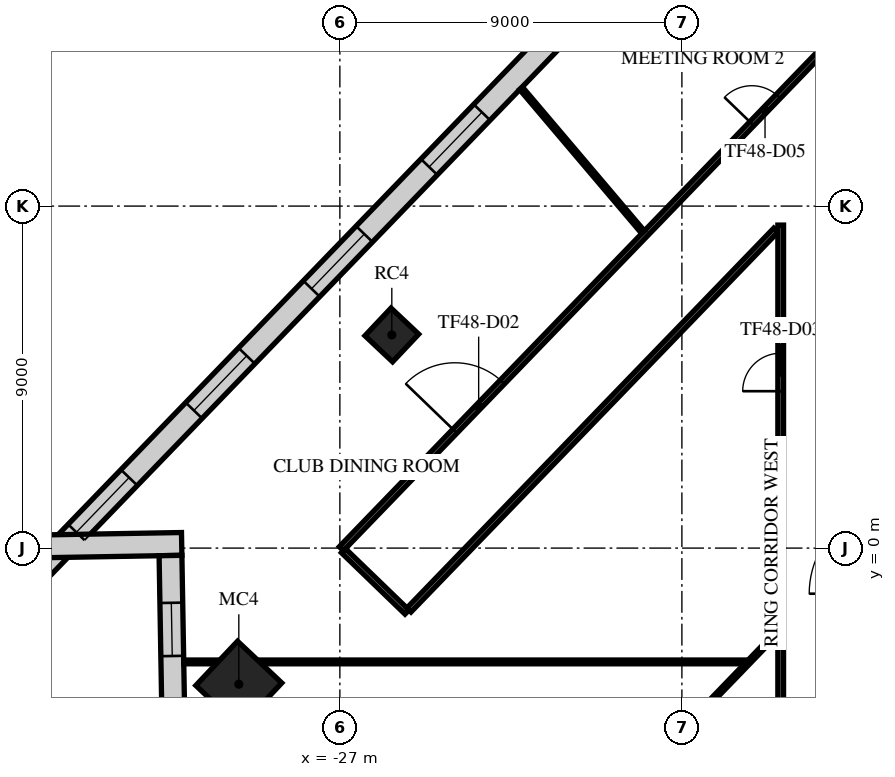
"""IFC4 building model, lengths in metres.
Left out: names, types, materials, properties, quantities, classifications, styles, units other than length and angle.
Written with IfcOpenShell. Run it as: python <this file> out.ifc"""

import sys

from ifc_helpers import new_model, si_unit, direction, frame, frame_2d, origin, origin_2d, place, context, subcontext, project, spatial, rectangle, extrude, element, fill, save


model = new_model("IFC4")
c1 = context("Model", 3, precision=1e-05, world=origin(), true_north=direction((0.0, 1.0)))
c2 = subcontext(c1, "Body", "Model", "MODEL_VIEW")
j1 = project(units=[si_unit("LENGTHUNIT", "METRE"), si_unit("PLANEANGLEUNIT", "RADIAN")], contexts=[c1])
p1 = place(None, origin())
s1 = spatial("IfcSite", under=j1, at=p1, CompositionType="ELEMENT")
p2 = place(p1, origin())
s2 = spatial("IfcBuilding", under=s1, at=p2, CompositionType="ELEMENT")
p3 = place(p2, frame((0.0, 0.0, 205.3)))
s3 = spatial("IfcBuildingStorey", under=s2, at=p3, CompositionType="ELEMENT", Elevation=205.3)
p4 = place(p3, frame((-25.633, 5.609, 0.0), z_axis=(0.0, 0.0, 1.0), x_axis=(0.685916152371, 0.727680583715, 0.0)))
e1 = element("IfcColumn", 1, at=p4, inside=s3, PredefinedType="COLUMN", context=c2, shape_type="SweptSolid", body=[
    extrude(rectangle(XDim=1.0, YDim=1.0, at=origin_2d()), origin(), (0.0, 0.0, 1.0), 4.0),
])
p5 = place(p3, frame((-29.659, -3.582, 0.0), z_axis=(0.0, 0.0, 1.0), x_axis=(0.685916152371, 0.727680583715, 0.0)))
e2 = element("IfcColumn", 2, at=p5, inside=s3, PredefinedType="COLUMN", context=c2, shape_type="SweptSolid", body=[
    extrude(rectangle(XDim=1.6, YDim=1.6, at=origin_2d()), origin(), (0.0, 0.0, 1.0), 4.0),
])
p6 = place(p3, frame((-0.749, 34.782, 0.0), z_axis=(0.0, 0.0, 1.0), x_axis=(-0.694657553534, -0.719340589233, 0.0)))
e3 = element("IfcWall", 3, at=p6, inside=s3, PredefinedType="STANDARD", context=c2, shape_type="SweptSolid", body=[
    extrude(rectangle(XDim=49.0, YDim=0.6, at=frame_2d((24.5, 0.0))), origin(), (0.0, 0.0, 1.0), 3.62),
])
p7 = place(p6, frame((1.227, 0.0, 0.9)))
e4 = element("IfcOpeningElement", 4, at=p7, cuts=e3, PredefinedType="OPENING", context=c2, shape_type="SweptSolid", body=[
    extrude(rectangle(XDim=2.0, YDim=2.1, at=frame_2d((1.0, 1.05))), frame((0.0, 0.31, 0.0), z_axis=(0.0, -1.0, 0.0), x_axis=(1.0, 0.0, 0.0)), (0.0, 0.0, 1.0), 0.62),
])
p8 = place(p6, frame((5.682, 0.0, 0.9)))
e5 = element("IfcOpeningElement", 5, at=p8, cuts=e3, PredefinedType="OPENING", context=c2, shape_type="SweptSolid", body=[
    extrude(rectangle(XDim=2.0, YDim=2.1, at=frame_2d((1.0, 1.05))), frame((0.0, 0.31, 0.0), z_axis=(0.0, -1.0, 0.0), x_axis=(1.0, 0.0, 0.0)), (0.0, 0.0, 1.0), 0.62),
])
p9 = place(p6, frame((10.136, 0.0, 0.9)))
e6 = element("IfcOpeningElement", 6, at=p9, cuts=e3, PredefinedType="OPENING", context=c2, shape_type="SweptSolid", body=[
    extrude(rectangle(XDim=2.0, YDim=2.1, at=frame_2d((1.0, 1.05))), frame((0.0, 0.31, 0.0), z_axis=(0.0, -1.0, 0.0), x_axis=(1.0, 0.0, 0.0)), (0.0, 0.0, 1.0), 0.62),
])
p10 = place(p6, frame((14.591, 0.0, 0.9)))
e7 = element("IfcOpeningElement", 7, at=p10, cuts=e3, PredefinedType="OPENING", context=c2, shape_type="SweptSolid", body=[
    extrude(rectangle(XDim=2.0, YDim=2.1, at=frame_2d((1.0, 1.05))), frame((0.0, 0.31, 0.0), z_axis=(0.0, -1.0, 0.0), x_axis=(1.0, 0.0, 0.0)), (0.0, 0.0, 1.0), 0.62),
])
p11 = place(p6, frame((19.045, 0.0, 0.9)))
e8 = element("IfcOpeningElement", 8, at=p11, cuts=e3, PredefinedType="OPENING", context=c2, shape_type="SweptSolid", body=[
    extrude(rectangle(XDim=2.0, YDim=2.1, at=frame_2d((1.0, 1.05))), frame((0.0, 0.31, 0.0), z_axis=(0.0, -1.0, 0.0), x_axis=(1.0, 0.0, 0.0)), (0.0, 0.0, 1.0), 0.62),
])
p12 = place(p6, frame((23.5, 0.0, 0.9)))
e9 = element("IfcOpeningElement", 9, at=p12, cuts=e3, PredefinedType="OPENING", context=c2, shape_type="SweptSolid", body=[
    extrude(rectangle(XDim=2.0, YDim=2.1, at=frame_2d((1.0, 1.05))), frame((0.0, 0.31, 0.0), z_axis=(0.0, -1.0, 0.0), x_axis=(1.0, 0.0, 0.0)), (0.0, 0.0, 1.0), 0.62),
])
p13 = place(p6, frame((27.955, 0.0, 0.9)))
e10 = element("IfcOpeningElement", 10, at=p13, cuts=e3, PredefinedType="OPENING", context=c2, shape_type="SweptSolid", body=[
    extrude(rectangle(XDim=2.0, YDim=2.1, at=frame_2d((1.0, 1.05))), frame((0.0, 0.31, 0.0), z_axis=(0.0, -1.0, 0.0), x_axis=(1.0, 0.0, 0.0)), (0.0, 0.0, 1.0), 0.62),
])
p14 = place(p6, frame((32.409, 0.0, 0.9)))
e11 = element("IfcOpeningElement", 11, at=p14, cuts=e3, PredefinedType="OPENING", context=c2, shape_type="SweptSolid", body=[
    extrude(rectangle(XDim=2.0, YDim=2.1, at=frame_2d((1.0, 1.05))), frame((0.0, 0.31, 0.0), z_axis=(0.0, -1.0, 0.0), x_axis=(1.0, 0.0, 0.0)), (0.0, 0.0, 1.0), 0.62),
])
p15 = place(p6, frame((36.864, 0.0, 0.9)))
e12 = element("IfcOpeningElement", 12, at=p15, cuts=e3, PredefinedType="OPENING", context=c2, shape_type="SweptSolid", body=[
    extrude(rectangle(XDim=2.0, YDim=2.1, at=frame_2d((1.0, 1.05))), frame((0.0, 0.31, 0.0), z_axis=(0.0, -1.0, 0.0), x_axis=(1.0, 0.0, 0.0)), (0.0, 0.0, 1.0), 0.62),
])
p16 = place(p6, frame((41.318, 0.0, 0.9)))
e13 = element("IfcOpeningElement", 13, at=p16, cuts=e3, PredefinedType="OPENING", context=c2, shape_type="SweptSolid", body=[
    extrude(rectangle(XDim=2.0, YDim=2.1, at=frame_2d((1.0, 1.05))), frame((0.0, 0.31, 0.0), z_axis=(0.0, -1.0, 0.0), x_axis=(1.0, 0.0, 0.0)), (0.0, 0.0, 1.0), 0.62),
])
p17 = place(p6, frame((45.773, 0.0, 0.9)))
e14 = element("IfcOpeningElement", 14, at=p17, cuts=e3, PredefinedType="OPENING", context=c2, shape_type="SweptSolid", body=[
    extrude(rectangle(XDim=2.0, YDim=2.1, at=frame_2d((1.0, 1.05))), frame((0.0, 0.31, 0.0), z_axis=(0.0, -1.0, 0.0), x_axis=(1.0, 0.0, 0.0)), (0.0, 0.0, 1.0), 0.62),
])
p18 = place(p3, frame((-35.008, 0.042, 0.0), z_axis=(0.0, 0.0, 1.0), x_axis=(0.999847642189, 0.017455440681, 0.0)))
e15 = element("IfcWall", 15, at=p18, inside=s3, PredefinedType="STANDARD", context=c2, shape_type="SweptSolid", body=[
    extrude(rectangle(XDim=3.846, YDim=0.6, at=frame_2d((1.923, 0.0))), origin(), (0.0, 0.0, 1.0), 3.62),
])
p19 = place(p3, frame((-31.457, -0.196, 0.0), z_axis=(0.0, 0.0, 1.0), x_axis=(0.017451978485, -0.999847702626, 0.0)))
e16 = element("IfcWall", 16, at=p19, inside=s3, PredefinedType="STANDARD", context=c2, shape_type="SweptSolid", body=[
    extrude(rectangle(XDim=7.778, YDim=0.6, at=frame_2d((3.889, 0.0))), origin(), (0.0, 0.0, 1.0), 3.62),
])
p20 = place(p19, frame((1.244, 0.0, 0.9)))
e17 = element("IfcOpeningElement", 17, at=p20, cuts=e16, PredefinedType="OPENING", context=c2, shape_type="SweptSolid", body=[
    extrude(rectangle(XDim=1.4, YDim=2.1, at=frame_2d((0.7, 1.05))), frame((0.0, 0.31, 0.0), z_axis=(0.0, -1.0, 0.0), x_axis=(1.0, 0.0, 0.0)), (0.0, 0.0, 1.0), 0.62),
])
p21 = place(p19, frame((5.134, 0.0, 0.9)))
e18 = element("IfcOpeningElement", 18, at=p21, cuts=e16, PredefinedType="OPENING", context=c2, shape_type="SweptSolid", body=[
    extrude(rectangle(XDim=1.4, YDim=2.1, at=frame_2d((0.7, 1.05))), frame((0.0, 0.31, 0.0), z_axis=(0.0, -1.0, 0.0), x_axis=(1.0, 0.0, 0.0)), (0.0, 0.0, 1.0), 0.62),
])
p22 = place(p3, frame((-26.96, -0.016, 0.0), z_axis=(0.0, 0.0, 1.0), x_axis=(0.694654845656, 0.719343204184, 0.0)))
e19 = element("IfcWall", 19, at=p22, inside=s3, PredefinedType="PARTITIONING", context=c2, shape_type="SweptSolid", body=[
    extrude(rectangle(XDim=37.479, YDim=0.15, at=frame_2d((18.74, 0.0))), origin(), (0.0, 0.0, 1.0), 2.97),
])
p23 = place(p22, frame((4.3, 0.0, 0.0)))
e20 = element("IfcOpeningElement", 20, at=p23, cuts=e19, PredefinedType="OPENING", context=c2, shape_type="SweptSolid", body=[
    extrude(rectangle(XDim=1.8, YDim=2.1, at=frame_2d((0.9, 1.05))), frame((0.0, 0.085, 0.0), z_axis=(0.0, -1.0, 0.0), x_axis=(1.0, 0.0, 0.0)), (0.0, 0.0, 1.0), 0.17),
])
p24 = place(p22, frame((15.547, 0.0, 0.0)))
e21 = element("IfcOpeningElement", 21, at=p24, cuts=e19, PredefinedType="OPENING", context=c2, shape_type="SweptSolid", body=[
    extrude(rectangle(XDim=1.0, YDim=2.1, at=frame_2d((0.5, 1.05))), frame((0.0, 0.085, 0.0), z_axis=(0.0, -1.0, 0.0), x_axis=(1.0, 0.0, 0.0)), (0.0, 0.0, 1.0), 0.17),
])
p25 = place(p22, frame((22.58, 0.0, 0.0)))
e22 = element("IfcOpeningElement", 22, at=p25, cuts=e19, PredefinedType="OPENING", context=c2, shape_type="SweptSolid", body=[
    extrude(rectangle(XDim=1.0, YDim=2.1, at=frame_2d((0.5, 1.05))), frame((0.0, 0.085, 0.0), z_axis=(0.0, -1.0, 0.0), x_axis=(1.0, 0.0, 0.0)), (0.0, 0.0, 1.0), 0.17),
])
p26 = place(p22, frame((35.508, 0.0, 0.0)))
e23 = element("IfcOpeningElement", 23, at=p26, cuts=e19, PredefinedType="OPENING", context=c2, shape_type="SweptSolid", body=[
    extrude(rectangle(XDim=1.0, YDim=2.1, at=frame_2d((0.5, 1.05))), frame((0.0, 0.085, 0.0), z_axis=(0.0, -1.0, 0.0), x_axis=(1.0, 0.0, 0.0)), (0.0, 0.0, 1.0), 0.17),
])
p27 = place(p3, frame((-26.906, -0.068, 0.0), z_axis=(0.0, 0.0, 1.0), x_axis=(0.719287446812, -0.694712580035, 0.0)))
e24 = element("IfcWall", 24, at=p27, inside=s3, PredefinedType="PARTITIONING", context=c2, shape_type="SweptSolid", body=[
    extrude(rectangle(XDim=2.325, YDim=0.15, at=frame_2d((1.162, 0.0))), origin(), (0.0, 0.0, 1.0), 3.62),
])
p28 = place(p3, frame((-25.182, -1.629, 0.0), z_axis=(0.0, 0.0, 1.0), x_axis=(0.694683242855, 0.719315780514, 0.0)))
e25 = element("IfcWall", 25, at=p28, inside=s3, PredefinedType="PARTITIONING", context=c2, shape_type="SweptSolid", body=[
    extrude(rectangle(XDim=13.896, YDim=0.15, at=frame_2d((6.948, 0.0))), origin(), (0.0, 0.0, 1.0), 3.17),
])
p29 = place(p3, frame((-15.4, -10.903, 0.0), z_axis=(0.0, 0.0, 1.0), x_axis=(0.0, 1.0, 0.0)))
e26 = element("IfcWall", 26, at=p29, inside=s3, PredefinedType="PARTITIONING", context=c2, shape_type="SweptSolid", body=[
    extrude(rectangle(XDim=19.403, YDim=0.15, at=frame_2d((9.702, 0.0))), origin(), (0.0, 0.0, 1.0), 3.17),
])
p30 = place(p29, frame((15.032, 0.0, 0.0)))
e27 = element("IfcOpeningElement", 27, at=p30, cuts=e26, PredefinedType="OPENING", context=c2, shape_type="SweptSolid", body=[
    extrude(rectangle(XDim=1.0, YDim=2.1, at=frame_2d((0.5, 1.05))), frame((0.0, 0.085, 0.0), z_axis=(0.0, -1.0, 0.0), x_axis=(1.0, 0.0, 0.0)), (0.0, 0.0, 1.0), 0.17),
])
p31 = place(p29, frame((1.05, 0.0, 0.0)))
e28 = element("IfcOpeningElement", 28, at=p31, cuts=e26, PredefinedType="OPENING", context=c2, shape_type="SweptSolid", body=[
    extrude(rectangle(XDim=1.0, YDim=2.1, at=frame_2d((0.5, 1.05))), frame((0.0, 0.085, 0.0), z_axis=(0.0, -1.0, 0.0), x_axis=(1.0, 0.0, 0.0)), (0.0, 0.0, 1.0), 0.17),
])
p32 = place(p3, frame((-31.106, -2.995, 0.0), z_axis=(0.0, 0.0, 1.0), x_axis=(1.0, 0.0, 0.0)))
e29 = element("IfcWall", 29, at=p32, inside=s3, PredefinedType="PARTITIONING", context=c2, shape_type="SweptSolid", body=[
    extrude(rectangle(XDim=0.901, YDim=0.1, at=frame_2d((0.45, 0.0))), origin(), (0.0, 0.0, 1.0), 3.62),
])
p33 = place(p3, frame((-29.115, -2.995, 0.0), z_axis=(0.0, 0.0, 1.0), x_axis=(1.0, 0.0, 0.0)))
e30 = element("IfcWall", 30, at=p33, inside=s3, PredefinedType="PARTITIONING", context=c2, shape_type="SweptSolid", body=[
    extrude(rectangle(XDim=12.762, YDim=0.1, at=frame_2d((6.381, 0.0))), origin(), (0.0, 0.0, 1.0), 3.05),
])
p34 = place(p3, frame((-22.233, 12.1, 0.0), z_axis=(0.0, 0.0, 1.0), x_axis=(0.646745011425, -0.762706293534, 0.0)))
e31 = element("IfcWall", 31, at=p34, inside=s3, PredefinedType="PARTITIONING", context=c2, shape_type="SweptSolid", body=[
    extrude(rectangle(XDim=4.96, YDim=0.1, at=frame_2d((2.48, 0.0))), origin(), (0.0, 0.0, 1.0), 2.97),
])
p35 = place(p3, frame((-20.56, -7.472, 0.0), z_axis=(0.0, 0.0, 1.0), x_axis=(0.694721601458, 0.719278733502, 0.0)))
e32 = element("IfcWall", 32, at=p35, inside=s3, PredefinedType="PARTITIONING", context=c2, shape_type="SweptSolid", body=[
    extrude(rectangle(XDim=7.267, YDim=0.1, at=frame_2d((3.634, 0.0))), origin(), (0.0, 0.0, 1.0), 3.17),
])
p36 = place(p14, origin())
e33 = element("IfcWindow", 33, at=p36, inside=s3, PartitioningType="SINGLE_PANEL", PredefinedType="WINDOW", context=c2, shape_type="SweptSolid", body=[
    extrude(rectangle(XDim=2.0, YDim=2.1, at=frame_2d((1.0, 1.05))), frame((0.0, 0.03, 0.0), z_axis=(0.0, -1.0, 0.0), x_axis=(1.0, 0.0, 0.0)), (0.0, 0.0, 1.0), 0.06),
])
fill(e11, e33)
p37 = place(p15, origin())
e34 = element("IfcWindow", 34, at=p37, inside=s3, PartitioningType="SINGLE_PANEL", PredefinedType="WINDOW", context=c2, shape_type="SweptSolid", body=[
    extrude(rectangle(XDim=2.0, YDim=2.1, at=frame_2d((1.0, 1.05))), frame((0.0, 0.03, 0.0), z_axis=(0.0, -1.0, 0.0), x_axis=(1.0, 0.0, 0.0)), (0.0, 0.0, 1.0), 0.06),
])
fill(e12, e34)
p38 = place(p16, origin())
e35 = element("IfcWindow", 35, at=p38, inside=s3, PartitioningType="SINGLE_PANEL", PredefinedType="WINDOW", context=c2, shape_type="SweptSolid", body=[
    extrude(rectangle(XDim=2.0, YDim=2.1, at=frame_2d((1.0, 1.05))), frame((0.0, 0.03, 0.0), z_axis=(0.0, -1.0, 0.0), x_axis=(1.0, 0.0, 0.0)), (0.0, 0.0, 1.0), 0.06),
])
fill(e13, e35)
p39 = place(p17, origin())
e36 = element("IfcWindow", 36, at=p39, inside=s3, PartitioningType="SINGLE_PANEL", PredefinedType="WINDOW", context=c2, shape_type="SweptSolid", body=[
    extrude(rectangle(XDim=2.0, YDim=2.1, at=frame_2d((1.0, 1.05))), frame((0.0, 0.03, 0.0), z_axis=(0.0, -1.0, 0.0), x_axis=(1.0, 0.0, 0.0)), (0.0, 0.0, 1.0), 0.06),
])
fill(e14, e36)
p40 = place(p20, origin())
e37 = element("IfcWindow", 37, at=p40, inside=s3, PartitioningType="SINGLE_PANEL", PredefinedType="WINDOW", context=c2, shape_type="SweptSolid", body=[
    extrude(rectangle(XDim=1.4, YDim=2.1, at=frame_2d((0.7, 1.05))), frame((0.0, 0.03, 0.0), z_axis=(0.0, -1.0, 0.0), x_axis=(1.0, 0.0, 0.0)), (0.0, 0.0, 1.0), 0.06),
])
fill(e17, e37)
p41 = place(p23, origin())
e38 = element("IfcDoor", 38, at=p41, inside=s3, OperationType="DOUBLE_DOOR_SINGLE_SWING", PredefinedType="DOOR", context=c2, shape_type="SweptSolid", body=[
    extrude(rectangle(XDim=1.8, YDim=2.1, at=frame_2d((0.9, 1.05))), frame((0.0, 0.025, 0.0), z_axis=(0.0, -1.0, 0.0), x_axis=(1.0, 0.0, 0.0)), (0.0, 0.0, 1.0), 0.05),
])
fill(e20, e38)
p42 = place(p30, origin())
e39 = element("IfcDoor", 39, at=p42, inside=s3, OperationType="SINGLE_SWING_RIGHT", PredefinedType="DOOR", context=c2, shape_type="SweptSolid", body=[
    extrude(rectangle(XDim=1.0, YDim=2.1, at=frame_2d((0.5, 1.05))), frame((0.0, 0.025, 0.0), z_axis=(0.0, -1.0, 0.0), x_axis=(1.0, 0.0, 0.0)), (0.0, 0.0, 1.0), 0.05),
])
fill(e27, e39)
p43 = place(p24, origin())
e40 = element("IfcDoor", 40, at=p43, inside=s3, OperationType="SINGLE_SWING_LEFT", PredefinedType="DOOR", context=c2, shape_type="SweptSolid", body=[
    extrude(rectangle(XDim=1.0, YDim=2.1, at=frame_2d((0.5, 1.05))), frame((0.0, 0.025, 0.0), z_axis=(0.0, -1.0, 0.0), x_axis=(1.0, 0.0, 0.0)), (0.0, 0.0, 1.0), 0.05),
])
fill(e21, e40)
save(model, sys.argv[1])
